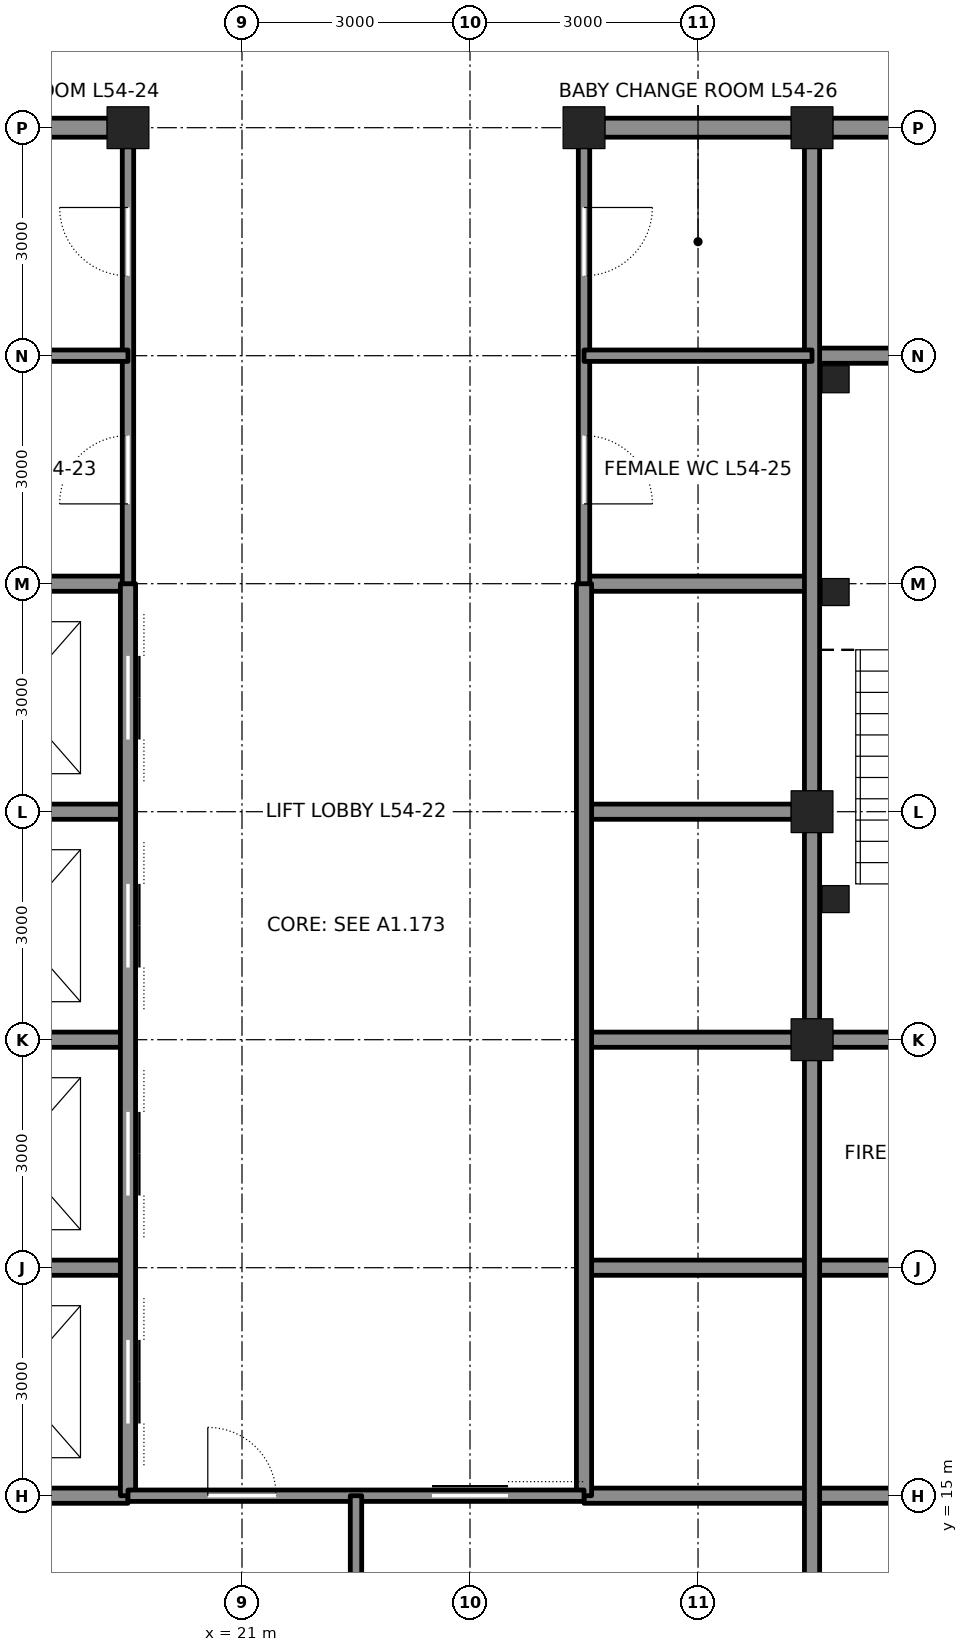
"""IFC4 building model, lengths in metres.
Left out: names, types, materials, properties, quantities, classifications, styles, units other than length and angle.
Written with IfcOpenShell. Run it as: python <this file> out.ifc"""

import sys

from ifc_helpers import new_model, si_unit, direction, frame, frame_2d, origin, origin_2d, place, context, subcontext, project, spatial, rectangle, hollow_rectangle, extrude, element, fill, save


model = new_model("IFC4")
c1 = context("Model", 3, precision=1e-05, world=origin(), true_north=direction((0.0, 1.0)))
c2 = subcontext(c1, "Body", "Model", "MODEL_VIEW")
j1 = project(units=[si_unit("LENGTHUNIT", "METRE"), si_unit("PLANEANGLEUNIT", "RADIAN")], contexts=[c1])
p1 = place(None, origin())
s1 = spatial("IfcSite", under=j1, at=p1, CompositionType="ELEMENT")
p2 = place(p1, origin())
s2 = spatial("IfcBuilding", under=s1, at=p2, CompositionType="ELEMENT")
p3 = place(p2, frame((0.0, 0.0, 243.3)))
s3 = spatial("IfcBuildingStorey", under=s2, at=p3, CompositionType="ELEMENT", Elevation=243.3)
for number, where, z_axis, x_axis in (
    (1, (19.5, 33.0, 0.0), (0.0, 0.0, 1.0), (1.0, 0.0, 0.0)),
    (2, (25.5, 33.0, 0.0), (0.0, 0.0, 1.0), (1.0, 0.0, 0.0)),
    (3, (28.5, 33.0, 0.0), (0.0, 0.0, 1.0), (1.0, 0.0, 0.0)),
    (4, (28.5, 21.0, 0.0), (0.0, 0.0, 1.0), (1.0, 0.0, 0.0)),
    (5, (28.5, 24.0, 0.0), (0.0, 0.0, 1.0), (1.0, 0.0, 0.0)),
):
    element("IfcColumn", number, at=place(p3, frame(where, z_axis=z_axis, x_axis=x_axis)), inside=s3, PredefinedType="COLUMN", context=c2, shape_type="SweptSolid", body=[
        extrude(hollow_rectangle(XDim=0.55, YDim=0.55, WallThickness=0.045, at=origin_2d()), origin(), (0.0, 0.0, 1.0), 4.2),
    ])
for number, where, z_axis, x_axis in (
    (6, (12.0, 15.0, 0.0), (0.0, 0.0, 1.0), (1.0, 0.0, 0.0)),
    (7, (25.5, 15.0, 0.0), (0.0, 0.0, 1.0), (1.0, 0.0, 0.0)),
):
    element("IfcWall", number, at=place(p3, frame(where, z_axis=z_axis, x_axis=x_axis)), inside=s3, PredefinedType="SOLIDWALL", context=c2, shape_type="SweptSolid", body=[
        extrude(rectangle(XDim=7.5, YDim=0.2, at=frame_2d((3.75, 0.0))), origin(), (0.0, 0.0, 1.0), 4.04),
    ])
for number, where, z_axis, x_axis in (
    (8, (16.75, 24.0, 0.0), (0.0, 0.0, 1.0), (1.0, 0.0, 0.0)),
    (9, (25.5, 24.0, 0.0), (0.0, 0.0, 1.0), (1.0, 0.0, 0.0)),
):
    element("IfcWall", number, at=place(p3, frame(where, z_axis=z_axis, x_axis=x_axis)), inside=s3, PredefinedType="SOLIDWALL", context=c2, shape_type="SweptSolid", body=[
        extrude(rectangle(XDim=2.75, YDim=0.2, at=frame_2d((1.375, 0.0))), origin(), (0.0, 0.0, 1.0), 3.09),
    ])
p4 = place(p3, frame((12.0, 27.0, 0.0), z_axis=(0.0, 0.0, 1.0), x_axis=(1.0, 0.0, 0.0)))
e10 = element("IfcWall", 10, at=p4, inside=s3, PredefinedType="SOLIDWALL", context=c2, shape_type="SweptSolid", body=[
    extrude(rectangle(XDim=7.5, YDim=0.2, at=frame_2d((3.75, 0.0))), origin(), (0.0, 0.0, 1.0), 4.04),
])
p5 = place(p4, frame((1.65, 0.0, 0.0)))
e11 = element("IfcOpeningElement", 11, at=p5, cuts=e10, PredefinedType="OPENING", context=c2, shape_type="SweptSolid", body=[
    extrude(rectangle(XDim=1.2, YDim=2.1, at=frame_2d((0.6, 1.05))), frame((0.0, 0.11, 0.0), z_axis=(0.0, -1.0, 0.0), x_axis=(1.0, 0.0, 0.0)), (0.0, 0.0, 1.0), 0.22),
])
p6 = place(p3, frame((25.5, 27.0, 0.0), z_axis=(0.0, 0.0, 1.0), x_axis=(1.0, 0.0, 0.0)))
e12 = element("IfcWall", 12, at=p6, inside=s3, PredefinedType="SOLIDWALL", context=c2, shape_type="SweptSolid", body=[
    extrude(rectangle(XDim=3.0, YDim=0.2, at=frame_2d((1.5, 0.0))), origin(), (0.0, 0.0, 1.0), 4.04),
])
p7 = place(p3, frame((28.5, 30.0, 0.0), z_axis=(0.0, 0.0, 1.0), x_axis=(1.0, 0.0, 0.0)))
e13 = element("IfcWall", 13, at=p7, inside=s3, PredefinedType="SOLIDWALL", context=c2, shape_type="SweptSolid", body=[
    extrude(rectangle(XDim=4.5, YDim=0.2, at=frame_2d((2.25, 0.0))), origin(), (0.0, 0.0, 1.0), 4.04),
])
for number, where, z_axis, x_axis in (
    (14, (16.75, 33.0, 0.0), (0.0, 0.0, 1.0), (1.0, 0.0, 0.0)),
    (15, (25.75, 33.0, 0.0), (0.0, 0.0, 1.0), (1.0, 0.0, 0.0)),
):
    element("IfcWall", number, at=place(p3, frame(where, z_axis=z_axis, x_axis=x_axis)), inside=s3, PredefinedType="SOLIDWALL", context=c2, shape_type="SweptSolid", body=[
        extrude(rectangle(XDim=2.5, YDim=0.25, at=frame_2d((1.25, 0.0))), origin(), (0.0, 0.0, 1.0), 3.181),
    ])
p8 = place(p3, frame((28.75, 33.0, 0.0), z_axis=(0.0, 0.0, 1.0), x_axis=(1.0, 0.0, 0.0)))
e16 = element("IfcWall", 16, at=p8, inside=s3, PredefinedType="SOLIDWALL", context=c2, shape_type="SweptSolid", body=[
    extrude(rectangle(XDim=4.0, YDim=0.25, at=frame_2d((2.0, 0.0))), origin(), (0.0, 0.0, 1.0), 3.181),
])
p9 = place(p3, frame((16.5, 18.0, 0.0), z_axis=(0.0, 0.0, 1.0), x_axis=(1.0, 0.0, 0.0)))
e17 = element("IfcWall", 17, at=p9, inside=s3, PredefinedType="SOLIDWALL", context=c2, shape_type="SweptSolid", body=[
    extrude(rectangle(XDim=3.0, YDim=0.2, at=frame_2d((1.5, 0.0))), origin(), (0.0, 0.0, 1.0), 4.04),
])
p10 = place(p3, frame((25.5, 18.0, 0.0), z_axis=(0.0, 0.0, 1.0), x_axis=(1.0, 0.0, 0.0)))
e18 = element("IfcWall", 18, at=p10, inside=s3, PredefinedType="SOLIDWALL", context=c2, shape_type="SweptSolid", body=[
    extrude(rectangle(XDim=7.5, YDim=0.2, at=frame_2d((3.75, 0.0))), origin(), (0.0, 0.0, 1.0), 4.04),
])
p11 = place(p10, frame((4.65, 0.0, 0.0)))
e19 = element("IfcOpeningElement", 19, at=p11, cuts=e18, PredefinedType="OPENING", context=c2, shape_type="SweptSolid", body=[
    extrude(rectangle(XDim=1.2, YDim=2.1, at=frame_2d((0.6, 1.05))), frame((0.0, 0.11, 0.0), z_axis=(0.0, -1.0, 0.0), x_axis=(1.0, 0.0, 0.0)), (0.0, 0.0, 1.0), 0.22),
])
for number, where, z_axis, x_axis in (
    (20, (16.75, 21.0, 0.0), (0.0, 0.0, 1.0), (1.0, 0.0, 0.0)),
    (21, (25.5, 21.0, 0.0), (0.0, 0.0, 1.0), (1.0, 0.0, 0.0)),
):
    element("IfcWall", number, at=place(p3, frame(where, z_axis=z_axis, x_axis=x_axis)), inside=s3, PredefinedType="SOLIDWALL", context=c2, shape_type="SweptSolid", body=[
        extrude(rectangle(XDim=2.75, YDim=0.2, at=frame_2d((1.375, 0.0))), origin(), (0.0, 0.0, 1.0), 3.09),
    ])
p12 = place(p3, frame((28.75, 21.0, 0.0), z_axis=(0.0, 0.0, 1.0), x_axis=(1.0, 0.0, 0.0)))
e22 = element("IfcWall", 22, at=p12, inside=s3, PredefinedType="SOLIDWALL", context=c2, shape_type="SweptSolid", body=[
    extrude(rectangle(XDim=4.0, YDim=0.2, at=frame_2d((2.0, 0.0))), origin(), (0.0, 0.0, 1.0), 3.09),
])
p13 = place(p12, frame((1.4, 0.0, 0.0)))
e23 = element("IfcOpeningElement", 23, at=p13, cuts=e22, PredefinedType="OPENING", context=c2, shape_type="SweptSolid", body=[
    extrude(rectangle(XDim=1.2, YDim=2.1, at=frame_2d((0.6, 1.05))), frame((0.0, 0.11, 0.0), z_axis=(0.0, -1.0, 0.0), x_axis=(1.0, 0.0, 0.0)), (0.0, 0.0, 1.0), 0.22),
])
p14 = place(p3, frame((19.5, 15.0, 0.0), z_axis=(0.0, 0.0, 1.0), x_axis=(0.0, 1.0, 0.0)))
e24 = element("IfcWall", 24, at=p14, inside=s3, PredefinedType="SOLIDWALL", context=c2, shape_type="SweptSolid", body=[
    extrude(rectangle(XDim=12.0, YDim=0.2, at=frame_2d((6.0, 0.0))), origin(), (0.0, 0.0, 1.0), 3.064),
])
p15 = place(p14, frame((0.95, 0.0, 0.0)))
e25 = element("IfcOpeningElement", 25, at=p15, cuts=e24, PredefinedType="OPENING", context=c2, shape_type="SweptSolid", body=[
    extrude(rectangle(XDim=1.1, YDim=2.1, at=frame_2d((0.55, 1.05))), frame((0.0, 0.11, 0.0), z_axis=(0.0, -1.0, 0.0), x_axis=(1.0, 0.0, 0.0)), (0.0, 0.0, 1.0), 0.22),
])
p16 = place(p14, frame((3.95, 0.0, 0.0)))
e26 = element("IfcOpeningElement", 26, at=p16, cuts=e24, PredefinedType="OPENING", context=c2, shape_type="SweptSolid", body=[
    extrude(rectangle(XDim=1.1, YDim=2.1, at=frame_2d((0.55, 1.05))), frame((0.0, 0.11, 0.0), z_axis=(0.0, -1.0, 0.0), x_axis=(1.0, 0.0, 0.0)), (0.0, 0.0, 1.0), 0.22),
])
p17 = place(p14, frame((6.95, 0.0, 0.0)))
e27 = element("IfcOpeningElement", 27, at=p17, cuts=e24, PredefinedType="OPENING", context=c2, shape_type="SweptSolid", body=[
    extrude(rectangle(XDim=1.1, YDim=2.1, at=frame_2d((0.55, 1.05))), frame((0.0, 0.11, 0.0), z_axis=(0.0, -1.0, 0.0), x_axis=(1.0, 0.0, 0.0)), (0.0, 0.0, 1.0), 0.22),
])
p18 = place(p14, frame((9.95, 0.0, 0.0)))
e28 = element("IfcOpeningElement", 28, at=p18, cuts=e24, PredefinedType="OPENING", context=c2, shape_type="SweptSolid", body=[
    extrude(rectangle(XDim=1.1, YDim=2.1, at=frame_2d((0.55, 1.05))), frame((0.0, 0.11, 0.0), z_axis=(0.0, -1.0, 0.0), x_axis=(1.0, 0.0, 0.0)), (0.0, 0.0, 1.0), 0.22),
])
p19 = place(p3, frame((19.5, 27.0, 0.0), z_axis=(0.0, 0.0, 1.0), x_axis=(0.0, 1.0, 0.0)))
e29 = element("IfcWall", 29, at=p19, inside=s3, PredefinedType="PARTITIONING", context=c2, shape_type="SweptSolid", body=[
    extrude(rectangle(XDim=5.75, YDim=0.15, at=frame_2d((2.875, 0.0))), origin(), (0.0, 0.0, 1.0), 3.064),
])
p20 = place(p19, frame((1.05, 0.0, 0.0)))
e30 = element("IfcOpeningElement", 30, at=p20, cuts=e29, PredefinedType="OPENING", context=c2, shape_type="SweptSolid", body=[
    extrude(rectangle(XDim=0.9, YDim=2.1, at=frame_2d((0.45, 1.05))), frame((0.0, 0.085, 0.0), z_axis=(0.0, -1.0, 0.0), x_axis=(1.0, 0.0, 0.0)), (0.0, 0.0, 1.0), 0.17),
])
p21 = place(p19, frame((4.05, 0.0, 0.0)))
e31 = element("IfcOpeningElement", 31, at=p21, cuts=e29, PredefinedType="OPENING", context=c2, shape_type="SweptSolid", body=[
    extrude(rectangle(XDim=0.9, YDim=2.1, at=frame_2d((0.45, 1.05))), frame((0.0, 0.085, 0.0), z_axis=(0.0, -1.0, 0.0), x_axis=(1.0, 0.0, 0.0)), (0.0, 0.0, 1.0), 0.17),
])
p22 = place(p3, frame((25.5, 15.0, 0.0), z_axis=(0.0, 0.0, 1.0), x_axis=(0.0, 1.0, 0.0)))
e32 = element("IfcWall", 32, at=p22, inside=s3, PredefinedType="SOLIDWALL", context=c2, shape_type="SweptSolid", body=[
    extrude(rectangle(XDim=12.0, YDim=0.2, at=frame_2d((6.0, 0.0))), origin(), (0.0, 0.0, 1.0), 3.064),
])
p23 = place(p3, frame((25.5, 27.0, 0.0), z_axis=(0.0, 0.0, 1.0), x_axis=(0.0, 1.0, 0.0)))
e33 = element("IfcWall", 33, at=p23, inside=s3, PredefinedType="PARTITIONING", context=c2, shape_type="SweptSolid", body=[
    extrude(rectangle(XDim=5.75, YDim=0.15, at=frame_2d((2.875, 0.0))), origin(), (0.0, 0.0, 1.0), 3.064),
])
p24 = place(p23, frame((1.05, 0.0, 0.0)))
e34 = element("IfcOpeningElement", 34, at=p24, cuts=e33, PredefinedType="OPENING", context=c2, shape_type="SweptSolid", body=[
    extrude(rectangle(XDim=0.9, YDim=2.1, at=frame_2d((0.45, 1.05))), frame((0.0, 0.085, 0.0), z_axis=(0.0, -1.0, 0.0), x_axis=(1.0, 0.0, 0.0)), (0.0, 0.0, 1.0), 0.17),
])
p25 = place(p23, frame((4.05, 0.0, 0.0)))
e35 = element("IfcOpeningElement", 35, at=p25, cuts=e33, PredefinedType="OPENING", context=c2, shape_type="SweptSolid", body=[
    extrude(rectangle(XDim=0.9, YDim=2.1, at=frame_2d((0.45, 1.05))), frame((0.0, 0.085, 0.0), z_axis=(0.0, -1.0, 0.0), x_axis=(1.0, 0.0, 0.0)), (0.0, 0.0, 1.0), 0.17),
])
p26 = place(p3, frame((28.5, 12.25, 0.0), z_axis=(0.0, 0.0, 1.0), x_axis=(0.0, 1.0, 0.0)))
e36 = element("IfcWall", 36, at=p26, inside=s3, PredefinedType="SOLIDWALL", context=c2, shape_type="SweptSolid", body=[
    extrude(rectangle(XDim=8.5, YDim=0.2, at=frame_2d((4.25, 0.0))), origin(), (0.0, 0.0, 1.0), 3.113),
])
p27 = place(p3, frame((28.5, 21.25, 0.0), z_axis=(0.0, 0.0, 1.0), x_axis=(0.0, 1.0, 0.0)))
e37 = element("IfcWall", 37, at=p27, inside=s3, PredefinedType="SOLIDWALL", context=c2, shape_type="SweptSolid", body=[
    extrude(rectangle(XDim=2.5, YDim=0.2, at=frame_2d((1.25, 0.0))), origin(), (0.0, 0.0, 1.0), 3.113),
])
p28 = place(p3, frame((28.5, 24.25, 0.0), z_axis=(0.0, 0.0, 1.0), x_axis=(0.0, 1.0, 0.0)))
e38 = element("IfcWall", 38, at=p28, inside=s3, PredefinedType="SOLIDWALL", context=c2, shape_type="SweptSolid", body=[
    extrude(rectangle(XDim=8.5, YDim=0.2, at=frame_2d((4.25, 0.0))), origin(), (0.0, 0.0, 1.0), 3.113),
])
p29 = place(p3, frame((19.5, 15.0, 0.0), z_axis=(0.0, 0.0, 1.0), x_axis=(1.0, 0.0, 0.0)))
e39 = element("IfcWall", 39, at=p29, inside=s3, PredefinedType="PARTITIONING", context=c2, shape_type="SweptSolid", body=[
    extrude(rectangle(XDim=6.0, YDim=0.15, at=frame_2d((3.0, 0.0))), origin(), (0.0, 0.0, 1.0), 4.04),
])
p30 = place(p29, frame((4.0, 0.0, 0.0)))
e40 = element("IfcOpeningElement", 40, at=p30, cuts=e39, PredefinedType="OPENING", context=c2, shape_type="SweptSolid", body=[
    extrude(rectangle(XDim=1.0, YDim=2.1, at=frame_2d((0.5, 1.05))), frame((0.0, 0.085, 0.0), z_axis=(0.0, -1.0, 0.0), x_axis=(1.0, 0.0, 0.0)), (0.0, 0.0, 1.0), 0.17),
])
p31 = place(p29, frame((1.05, 0.0, 0.0)))
e41 = element("IfcOpeningElement", 41, at=p31, cuts=e39, PredefinedType="OPENING", context=c2, shape_type="SweptSolid", body=[
    extrude(rectangle(XDim=0.9, YDim=2.1, at=frame_2d((0.45, 1.05))), frame((0.0, 0.085, 0.0), z_axis=(0.0, -1.0, 0.0), x_axis=(1.0, 0.0, 0.0)), (0.0, 0.0, 1.0), 0.17),
])
for number, where, z_axis, x_axis in (
    (42, (22.5, 15.0, 0.0), (0.0, 0.0, 1.0), (0.0, -1.0, 0.0)),
    (43, (16.5, 30.0, 0.0), (0.0, 0.0, 1.0), (1.0, 0.0, 0.0)),
    (44, (25.5, 30.0, 0.0), (0.0, 0.0, 1.0), (1.0, 0.0, 0.0)),
):
    element("IfcWall", number, at=place(p3, frame(where, z_axis=z_axis, x_axis=x_axis)), inside=s3, PredefinedType="PARTITIONING", context=c2, shape_type="SweptSolid", body=[
        extrude(rectangle(XDim=3.0, YDim=0.15, at=frame_2d((1.5, 0.0))), origin(), (0.0, 0.0, 1.0), 4.04),
    ])
for number, where, z_axis, x_axis in (
    (45, (28.81, 29.69, 0.0), (0.0, 0.0, 1.0), (1.0, 0.0, 0.0)),
    (46, (28.81, 26.89, 0.0), (0.0, 0.0, 1.0), (1.0, 0.0, 0.0)),
    (47, (28.81, 22.85, 0.0), (0.0, 0.0, 1.0), (1.0, 0.0, 0.0)),
):
    element("IfcColumn", number, at=place(p3, frame(where, z_axis=z_axis, x_axis=x_axis)), inside=s3, PredefinedType="COLUMN", context=c2, shape_type="SweptSolid", body=[
        extrude(hollow_rectangle(XDim=0.356, YDim=0.356, WallThickness=0.009, at=origin_2d()), origin(), (0.0, 0.0, 1.0), 4.2),
    ])
p32 = place(p20, origin())
e48 = element("IfcDoor", 48, at=p32, inside=s3, OperationType="SINGLE_SWING_LEFT", PredefinedType="DOOR", context=c2, shape_type="SweptSolid", body=[
    extrude(rectangle(XDim=0.9, YDim=2.1, at=frame_2d((0.45, 1.05))), frame((0.0, 0.025, 0.0), z_axis=(0.0, -1.0, 0.0), x_axis=(1.0, 0.0, 0.0)), (0.0, 0.0, 1.0), 0.05),
])
fill(e30, e48)
p33 = place(p21, origin())
e49 = element("IfcDoor", 49, at=p33, inside=s3, OperationType="SINGLE_SWING_RIGHT", PredefinedType="DOOR", context=c2, shape_type="SweptSolid", body=[
    extrude(rectangle(XDim=0.9, YDim=2.1, at=frame_2d((0.45, 1.05))), frame((0.0, 0.025, 0.0), z_axis=(0.0, -1.0, 0.0), x_axis=(1.0, 0.0, 0.0)), (0.0, 0.0, 1.0), 0.05),
])
fill(e31, e49)
p34 = place(p24, frame((0.9, 0.0, 0.0), z_axis=(0.0, 0.0, 1.0), x_axis=(-1.0, 0.0, 0.0)))
e50 = element("IfcDoor", 50, at=p34, inside=s3, OperationType="SINGLE_SWING_RIGHT", PredefinedType="DOOR", context=c2, shape_type="SweptSolid", body=[
    extrude(rectangle(XDim=0.9, YDim=2.1, at=frame_2d((0.45, 1.05))), frame((0.0, 0.025, 0.0), z_axis=(0.0, -1.0, 0.0), x_axis=(1.0, 0.0, 0.0)), (0.0, 0.0, 1.0), 0.05),
])
fill(e34, e50)
p35 = place(p25, frame((0.9, 0.0, 0.0), z_axis=(0.0, 0.0, 1.0), x_axis=(-1.0, 0.0, 0.0)))
e51 = element("IfcDoor", 51, at=p35, inside=s3, OperationType="SINGLE_SWING_LEFT", PredefinedType="DOOR", context=c2, shape_type="SweptSolid", body=[
    extrude(rectangle(XDim=0.9, YDim=2.1, at=frame_2d((0.45, 1.05))), frame((0.0, 0.025, 0.0), z_axis=(0.0, -1.0, 0.0), x_axis=(1.0, 0.0, 0.0)), (0.0, 0.0, 1.0), 0.05),
])
fill(e35, e51)
p36 = place(p30, origin())
e52 = element("IfcDoor", 52, at=p36, inside=s3, OperationType="SLIDING_TO_LEFT", PredefinedType="DOOR", context=c2, shape_type="SweptSolid", body=[
    extrude(rectangle(XDim=1.0, YDim=2.1, at=frame_2d((0.5, 1.05))), frame((0.0, 0.025, 0.0), z_axis=(0.0, -1.0, 0.0), x_axis=(1.0, 0.0, 0.0)), (0.0, 0.0, 1.0), 0.05),
])
fill(e40, e52)
p37 = place(p31, origin())
e53 = element("IfcDoor", 53, at=p37, inside=s3, OperationType="SINGLE_SWING_LEFT", PredefinedType="DOOR", context=c2, shape_type="SweptSolid", body=[
    extrude(rectangle(XDim=0.9, YDim=2.1, at=frame_2d((0.45, 1.05))), frame((0.0, 0.025, 0.0), z_axis=(0.0, -1.0, 0.0), x_axis=(1.0, 0.0, 0.0)), (0.0, 0.0, 1.0), 0.05),
])
fill(e41, e53)
p38 = place(p15, origin())
e54 = element("IfcDoor", 54, at=p38, inside=s3, OperationType="DOUBLE_DOOR_SLIDING", PredefinedType="DOOR", context=c2, shape_type="SweptSolid", body=[
    extrude(rectangle(XDim=1.1, YDim=2.1, at=frame_2d((0.55, 1.05))), frame((0.0, 0.025, 0.0), z_axis=(0.0, -1.0, 0.0), x_axis=(1.0, 0.0, 0.0)), (0.0, 0.0, 1.0), 0.05),
])
fill(e25, e54)
p39 = place(p16, origin())
e55 = element("IfcDoor", 55, at=p39, inside=s3, OperationType="DOUBLE_DOOR_SLIDING", PredefinedType="DOOR", context=c2, shape_type="SweptSolid", body=[
    extrude(rectangle(XDim=1.1, YDim=2.1, at=frame_2d((0.55, 1.05))), frame((0.0, 0.025, 0.0), z_axis=(0.0, -1.0, 0.0), x_axis=(1.0, 0.0, 0.0)), (0.0, 0.0, 1.0), 0.05),
])
fill(e26, e55)
p40 = place(p17, origin())
e56 = element("IfcDoor", 56, at=p40, inside=s3, OperationType="DOUBLE_DOOR_SLIDING", PredefinedType="DOOR", context=c2, shape_type="SweptSolid", body=[
    extrude(rectangle(XDim=1.1, YDim=2.1, at=frame_2d((0.55, 1.05))), frame((0.0, 0.025, 0.0), z_axis=(0.0, -1.0, 0.0), x_axis=(1.0, 0.0, 0.0)), (0.0, 0.0, 1.0), 0.05),
])
fill(e27, e56)
p41 = place(p18, origin())
e57 = element("IfcDoor", 57, at=p41, inside=s3, OperationType="DOUBLE_DOOR_SLIDING", PredefinedType="DOOR", context=c2, shape_type="SweptSolid", body=[
    extrude(rectangle(XDim=1.1, YDim=2.1, at=frame_2d((0.55, 1.05))), frame((0.0, 0.025, 0.0), z_axis=(0.0, -1.0, 0.0), x_axis=(1.0, 0.0, 0.0)), (0.0, 0.0, 1.0), 0.05),
])
fill(e28, e57)
save(model, sys.argv[1])
